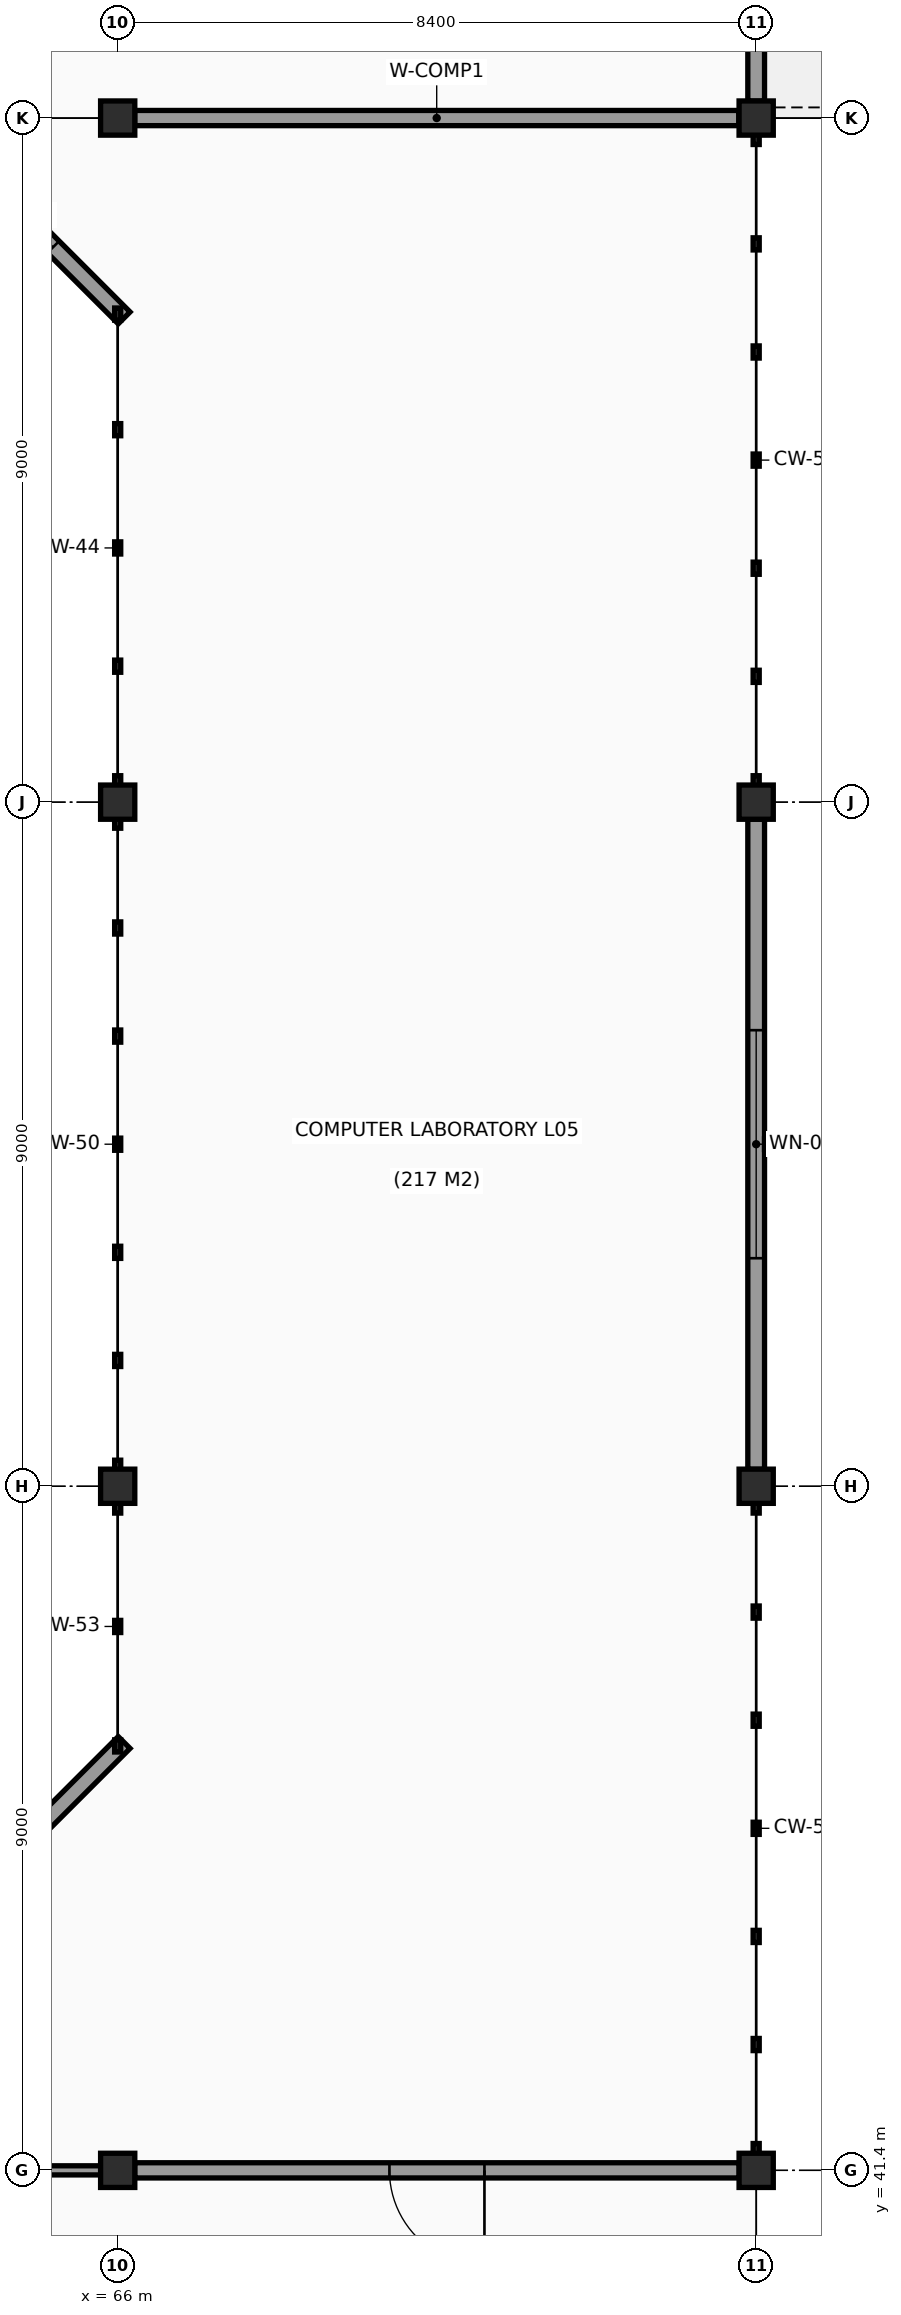
"""IFC4 building model, lengths in metres.
Left out: names, types, materials, properties, quantities, classifications, styles, units other than length and angle.
Written with IfcOpenShell. Run it as: python <this file> out.ifc"""

import sys

from ifc_helpers import new_model, si_unit, direction, frame, frame_2d, origin, origin_2d, place, context, subcontext, project, spatial, rectangle, extrude, element, fill, save


model = new_model("IFC4")
c1 = context("Model", 3, precision=1e-05, world=origin(), true_north=direction((0.0, 1.0)))
c2 = subcontext(c1, "Body", "Model", "MODEL_VIEW")
j1 = project(units=[si_unit("LENGTHUNIT", "METRE"), si_unit("PLANEANGLEUNIT", "RADIAN")], contexts=[c1])
p1 = place(None, origin())
s1 = spatial("IfcSite", under=j1, at=p1, CompositionType="ELEMENT")
p2 = place(p1, origin())
s2 = spatial("IfcBuilding", under=s1, at=p2, CompositionType="ELEMENT")
p3 = place(p2, frame((0.0, 0.0, 18.6)))
s3 = spatial("IfcBuildingStorey", under=s2, at=p3, CompositionType="ELEMENT", Elevation=18.6)
for number, where, z_axis, x_axis in (
    (1, (66.0, 41.4, 0.0), (0.0, 0.0, 1.0), (1.0, 0.0, 0.0)),
    (2, (66.0, 50.4, 0.0), (0.0, 0.0, 1.0), (1.0, 0.0, 0.0)),
    (3, (66.0, 59.4, 0.0), (0.0, 0.0, 1.0), (1.0, 0.0, 0.0)),
    (4, (66.0, 68.4, 0.0), (0.0, 0.0, 1.0), (1.0, 0.0, 0.0)),
    (5, (74.4, 41.4, 0.0), (0.0, 0.0, 1.0), (1.0, 0.0, 0.0)),
    (6, (74.4, 50.4, 0.0), (0.0, 0.0, 1.0), (1.0, 0.0, 0.0)),
    (7, (74.4, 59.4, 0.0), (0.0, 0.0, 1.0), (1.0, 0.0, 0.0)),
    (8, (74.4, 68.4, 0.0), (0.0, 0.0, 1.0), (1.0, 0.0, 0.0)),
):
    element("IfcColumn", number, at=place(p3, frame(where, z_axis=z_axis, x_axis=x_axis)), inside=s3, PredefinedType="COLUMN", context=c2, shape_type="SweptSolid", body=[
        extrude(rectangle(XDim=0.45, YDim=0.45, at=origin_2d()), origin(), (0.0, 0.0, 1.0), 3.35),
    ])
p4 = place(p3, frame((74.4, 71.177, 0.0), z_axis=(0.0, 0.0, 1.0), x_axis=(0.0, -1.0, 0.0)))
e9 = element("IfcWall", 9, at=p4, inside=s3, PredefinedType="SOLIDWALL", context=c2, shape_type="SweptSolid", body=[
    extrude(rectangle(XDim=2.554, YDim=0.22, at=frame_2d((1.277, 0.0))), origin(), (0.0, 0.0, 1.0), 2.65),
])
p5 = place(p4, frame((0.677, 0.0, 0.95)))
e10 = element("IfcOpeningElement", 10, at=p5, cuts=e9, PredefinedType="OPENING", context=c2, shape_type="SweptSolid", body=[
    extrude(rectangle(XDim=1.2, YDim=1.2, at=frame_2d((0.6, 0.6))), frame((0.0, 0.12, 0.0), z_axis=(0.0, -1.0, 0.0), x_axis=(1.0, 0.0, 0.0)), (0.0, 0.0, 1.0), 0.24),
])
p6 = place(p3, frame((74.4, 59.177, 0.0), z_axis=(0.0, 0.0, 1.0), x_axis=(0.0, -1.0, 0.0)))
e11 = element("IfcWall", 11, at=p6, inside=s3, PredefinedType="SOLIDWALL", context=c2, shape_type="SweptSolid", body=[
    extrude(rectangle(XDim=8.554, YDim=0.22, at=frame_2d((4.277, 0.0))), origin(), (0.0, 0.0, 1.0), 2.65),
])
p7 = place(p6, frame((2.777, 0.0, 0.95)))
e12 = element("IfcOpeningElement", 12, at=p7, cuts=e11, PredefinedType="OPENING", context=c2, shape_type="SweptSolid", body=[
    extrude(rectangle(XDim=3.0, YDim=1.2, at=frame_2d((1.5, 0.6))), frame((0.0, 0.12, 0.0), z_axis=(0.0, -1.0, 0.0), x_axis=(1.0, 0.0, 0.0)), (0.0, 0.0, 1.0), 0.24),
])
p8 = place(p3, frame((60.371, 41.315, 0.0), z_axis=(0.0, 0.0, 1.0), x_axis=(0.707121887885, 0.707091674165, 0.0)))
e13 = element("IfcWall", 13, at=p8, inside=s3, PredefinedType="SOLIDWALL", context=c2, shape_type="SweptSolid", body=[
    extrude(rectangle(XDim=8.081, YDim=0.22, at=frame_2d((4.04, 0.0))), origin(), (0.0, 0.0, 1.0), 2.55),
])
p9 = place(p3, frame((66.085, 65.771, 0.0), z_axis=(0.0, 0.0, 1.0), x_axis=(-0.707106781187, 0.707106781187, 0.0)))
e14 = element("IfcWall", 14, at=p9, inside=s3, PredefinedType="SOLIDWALL", context=c2, shape_type="SweptSolid", body=[
    extrude(rectangle(XDim=3.838, YDim=0.22, at=frame_2d((1.919, 0.0))), origin(), (0.0, 0.0, 1.0), 2.65),
])
p10 = place(p9, frame((1.319, 0.0, 0.95)))
e15 = element("IfcOpeningElement", 15, at=p10, cuts=e14, PredefinedType="OPENING", context=c2, shape_type="SweptSolid", body=[
    extrude(rectangle(XDim=1.2, YDim=1.2, at=frame_2d((0.6, 0.6))), frame((0.0, 0.12, 0.0), z_axis=(0.0, -1.0, 0.0), x_axis=(1.0, 0.0, 0.0)), (0.0, 0.0, 1.0), 0.24),
])
p11 = place(p3, frame((60.908, 41.4, 0.0), z_axis=(0.0, 0.0, 1.0), x_axis=(1.0, 0.0, 0.0)))
e16 = element("IfcWall", 16, at=p11, inside=s3, PredefinedType="PARTITIONING", context=c2, shape_type="SweptSolid", body=[
    extrude(rectangle(XDim=4.869, YDim=0.12, at=frame_2d((2.434, 0.0))), origin(), (0.0, 0.0, 1.0), 2.55),
])
p12 = place(p3, frame((74.177, 41.4, 0.0), z_axis=(0.0, 0.0, 1.0), x_axis=(-1.0, 0.0, 0.0)))
e17 = element("IfcWall", 17, at=p12, inside=s3, PredefinedType="PARTITIONING", context=c2, shape_type="SweptSolid", body=[
    extrude(rectangle(XDim=7.954, YDim=0.2, at=frame_2d((3.977, 0.0))), origin(), (0.0, 0.0, 1.0), 2.55),
])
p13 = place(p12, frame((3.352, 0.0, 0.0)))
e18 = element("IfcOpeningElement", 18, at=p13, cuts=e17, PredefinedType="OPENING", context=c2, shape_type="SweptSolid", body=[
    extrude(rectangle(XDim=1.25, YDim=2.15, at=frame_2d((0.625, 1.075))), frame((0.0, 0.11, 0.0), z_axis=(0.0, -1.0, 0.0), x_axis=(1.0, 0.0, 0.0)), (0.0, 0.0, 1.0), 0.22),
])
p14 = place(p3, frame((66.223, 68.4, 0.0), z_axis=(0.0, 0.0, 1.0), x_axis=(1.0, 0.0, 0.0)))
e19 = element("IfcWall", 19, at=p14, inside=s3, PredefinedType="PARTITIONING", context=c2, shape_type="SweptSolid", body=[
    extrude(rectangle(XDim=7.948, YDim=0.2, at=frame_2d((3.974, 0.0))), origin(), (0.0, 0.0, 1.0), 2.6),
])
p15 = place(p7, origin())
e20 = element("IfcWindow", 20, at=p15, inside=s3, PartitioningType="SINGLE_PANEL", PredefinedType="WINDOW", context=c2, shape_type="SweptSolid", body=[
    extrude(rectangle(XDim=3.0, YDim=1.2, at=frame_2d((1.5, 0.6))), frame((0.0, 0.03, 0.0), z_axis=(0.0, -1.0, 0.0), x_axis=(1.0, 0.0, 0.0)), (0.0, 0.0, 1.0), 0.06),
])
fill(e12, e20)
p16 = place(p10, origin())
e21 = element("IfcWindow", 21, at=p16, inside=s3, PartitioningType="SINGLE_PANEL", PredefinedType="WINDOW", context=c2, shape_type="SweptSolid", body=[
    extrude(rectangle(XDim=1.2, YDim=1.2, at=frame_2d((0.6, 0.6))), frame((0.0, 0.03, 0.0), z_axis=(0.0, -1.0, 0.0), x_axis=(1.0, 0.0, 0.0)), (0.0, 0.0, 1.0), 0.06),
])
fill(e15, e21)
p17 = place(p13, origin())
e22 = element("IfcDoor", 22, at=p17, inside=s3, OperationType="SINGLE_SWING_LEFT", PredefinedType="DOOR", context=c2, shape_type="SweptSolid", body=[
    extrude(rectangle(XDim=1.25, YDim=2.15, at=frame_2d((0.625, 1.075))), frame((0.0, 0.025, 0.0), z_axis=(0.0, -1.0, 0.0), x_axis=(1.0, 0.0, 0.0)), (0.0, 0.0, 1.0), 0.05),
])
fill(e18, e22)
save(model, sys.argv[1])
